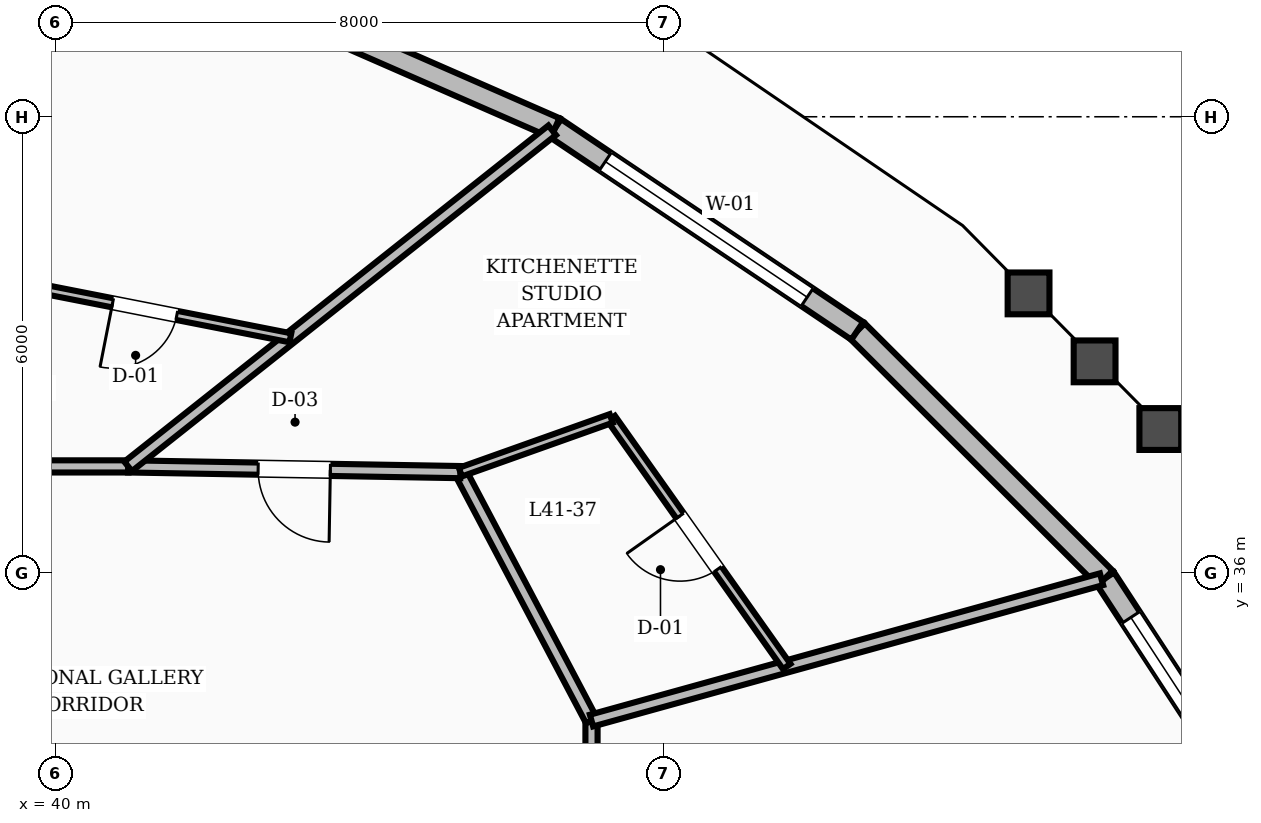
"""IFC4 building model, lengths in metres.
Left out: names, types, materials, properties, quantities, classifications, styles, units other than length and angle.
Written with IfcOpenShell. Run it as: python <this file> out.ifc"""

import sys

from ifc_helpers import new_model, si_unit, direction, frame, frame_2d, origin, place, context, subcontext, project, spatial, rectangle, extrude, element, fill, save


model = new_model("IFC4")
c1 = context("Model", 3, precision=1e-05, world=origin(), true_north=direction((0.0, 1.0)))
c2 = subcontext(c1, "Body", "Model", "MODEL_VIEW")
j1 = project(units=[si_unit("LENGTHUNIT", "METRE"), si_unit("PLANEANGLEUNIT", "RADIAN")], contexts=[c1])
p1 = place(None, origin())
s1 = spatial("IfcSite", under=j1, at=p1, CompositionType="ELEMENT")
p2 = place(p1, origin())
s2 = spatial("IfcBuilding", under=s1, at=p2, CompositionType="ELEMENT")
p3 = place(p2, frame((0.0, 0.0, 160.4)))
s3 = spatial("IfcBuildingStorey", under=s2, at=p3, CompositionType="ELEMENT", Elevation=160.4)
p4 = place(p3, frame((56.232, 32.217, 0.0), z_axis=(0.0, 0.0, 1.0), x_axis=(-0.546719569092, 0.837315778409, 0.0)))
e1 = element("IfcWall", 1, at=p4, inside=s3, PredefinedType="STANDARD", context=c2, shape_type="SweptSolid", body=[
    extrude(rectangle(XDim=4.433, YDim=0.28, at=frame_2d((2.217, 0.0))), origin(), (0.0, 0.0, 1.0), 2.82),
])
p5 = place(p4, frame((0.617, 0.0, 0.8)))
e2 = element("IfcOpeningElement", 2, at=p5, cuts=e1, PredefinedType="OPENING", context=c2, shape_type="SweptSolid", body=[
    extrude(rectangle(XDim=3.2, YDim=1.65, at=frame_2d((1.6, 0.825))), frame((0.0, 0.15, 0.0), z_axis=(0.0, -1.0, 0.0), x_axis=(1.0, 0.0, 0.0)), (0.0, 0.0, 1.0), 0.3),
])
p6 = place(p3, frame((53.809, 35.929, 0.0), z_axis=(0.0, 0.0, 1.0), x_axis=(-0.707980552396, 0.706231928922, 0.0)))
e3 = element("IfcWall", 3, at=p6, inside=s3, PredefinedType="STANDARD", context=c2, shape_type="SweptSolid", body=[
    extrude(rectangle(XDim=4.607, YDim=0.28, at=frame_2d((2.304, 0.0))), origin(), (0.0, 0.0, 1.0), 2.82),
])
p7 = place(p3, frame((50.547, 39.183, 0.0), z_axis=(0.0, 0.0, 1.0), x_axis=(-0.830052550014, 0.557685183787, 0.0)))
e4 = element("IfcWall", 4, at=p7, inside=s3, PredefinedType="STANDARD", context=c2, shape_type="SweptSolid", body=[
    extrude(rectangle(XDim=4.788, YDim=0.28, at=frame_2d((2.394, 0.0))), origin(), (0.0, 0.0, 1.0), 2.82),
])
p8 = place(p7, frame((0.794, 0.0, 0.8)))
e5 = element("IfcOpeningElement", 5, at=p8, cuts=e4, PredefinedType="OPENING", context=c2, shape_type="SweptSolid", body=[
    extrude(rectangle(XDim=3.2, YDim=1.65, at=frame_2d((1.6, 0.825))), frame((0.0, 0.15, 0.0), z_axis=(0.0, -1.0, 0.0), x_axis=(1.0, 0.0, 0.0)), (0.0, 0.0, 1.0), 0.3),
])
p9 = place(p3, frame((46.572, 41.854, 0.0), z_axis=(0.0, 0.0, 1.0), x_axis=(-0.916141485862, 0.400855058447, 0.0)))
e6 = element("IfcWall", 6, at=p9, inside=s3, PredefinedType="STANDARD", context=c2, shape_type="SweptSolid", body=[
    extrude(rectangle(XDim=4.95, YDim=0.28, at=frame_2d((2.475, 0.0))), origin(), (0.0, 0.0, 1.0), 2.82),
])
p10 = place(p3, frame((47.05, 30.234, 0.0), z_axis=(0.0, 0.0, 1.0), x_axis=(0.0, 1.0, 0.0)))
e7 = element("IfcWall", 7, at=p10, inside=s3, PredefinedType="SOLIDWALL", context=c2, shape_type="SweptSolid", body=[
    extrude(rectangle(XDim=3.822, YDim=0.16, at=frame_2d((1.911, 0.0))), origin(), (0.0, 0.0, 1.0), 2.8),
])
p11 = place(p10, frame((1.436, 0.0, 0.0)))
e8 = element("IfcOpeningElement", 8, at=p11, cuts=e7, PredefinedType="OPENING", context=c2, shape_type="SweptSolid", body=[
    extrude(rectangle(XDim=0.95, YDim=2.1, at=frame_2d((0.475, 1.05))), frame((0.0, 0.09, 0.0), z_axis=(0.0, -1.0, 0.0), x_axis=(1.0, 0.0, 0.0)), (0.0, 0.0, 1.0), 0.18),
])
p12 = place(p3, frame((47.05, 34.056, 0.0), z_axis=(0.0, 0.0, 1.0), x_axis=(-0.466737093093, 0.884396113702, 0.0)))
e9 = element("IfcWall", 9, at=p12, inside=s3, PredefinedType="SOLIDWALL", context=c2, shape_type="SweptSolid", body=[
    extrude(rectangle(XDim=3.696, YDim=0.16, at=frame_2d((1.848, 0.0))), origin(), (0.0, 0.0, 1.0), 2.8),
])
p13 = place(p3, frame((45.325, 37.325, 0.0), z_axis=(0.0, 0.0, 1.0), x_axis=(-0.999853038912, 0.017143528788, 0.0)))
e10 = element("IfcWall", 10, at=p13, inside=s3, PredefinedType="SOLIDWALL", context=c2, shape_type="SweptSolid", body=[
    extrude(rectangle(XDim=4.372, YDim=0.16, at=frame_2d((2.186, 0.0))), origin(), (0.0, 0.0, 1.0), 2.8),
])
p14 = place(p13, frame((1.711, 0.0, 0.0)))
e11 = element("IfcOpeningElement", 11, at=p14, cuts=e10, PredefinedType="OPENING", context=c2, shape_type="SweptSolid", body=[
    extrude(rectangle(XDim=0.95, YDim=2.1, at=frame_2d((0.475, 1.05))), frame((0.0, 0.09, 0.0), z_axis=(0.0, -1.0, 0.0), x_axis=(1.0, 0.0, 0.0)), (0.0, 0.0, 1.0), 0.18),
])
p15 = place(p3, frame((40.954, 37.4, 0.0), z_axis=(0.0, 0.0, 1.0), x_axis=(-1.0, 0.0, 0.0)))
e12 = element("IfcWall", 12, at=p15, inside=s3, PredefinedType="SOLIDWALL", context=c2, shape_type="SweptSolid", body=[
    extrude(rectangle(XDim=3.403, YDim=0.16, at=frame_2d((1.702, 0.0))), origin(), (0.0, 0.0, 1.0), 2.8),
])
p16 = place(p3, frame((47.05, 34.056, 0.0), z_axis=(0.0, 0.0, 1.0), x_axis=(0.963668952893, 0.267099511848, 0.0)))
e13 = element("IfcWall", 13, at=p16, inside=s3, PredefinedType="SOLIDWALL", context=c2, shape_type="SweptSolid", body=[
    extrude(rectangle(XDim=6.963, YDim=0.16, at=frame_2d((3.481, 0.0))), origin(), (0.0, 0.0, 1.0), 2.8),
])
p17 = place(p3, frame((49.618, 34.768, 0.0), z_axis=(0.0, 0.0, 1.0), x_axis=(-0.577627537934, 0.816300451684, 0.0)))
e14 = element("IfcWall", 14, at=p17, inside=s3, PredefinedType="PARTITIONING", context=c2, shape_type="SweptSolid", body=[
    extrude(rectangle(XDim=3.998, YDim=0.12, at=frame_2d((1.999, 0.0))), origin(), (0.0, 0.0, 1.0), 2.8),
])
p18 = place(p17, frame((1.569, 0.0, 0.0)))
e15 = element("IfcOpeningElement", 15, at=p18, cuts=e14, PredefinedType="OPENING", context=c2, shape_type="SweptSolid", body=[
    extrude(rectangle(XDim=0.86, YDim=2.1, at=frame_2d((0.43, 1.05))), frame((0.0, 0.07, 0.0), z_axis=(0.0, -1.0, 0.0), x_axis=(1.0, 0.0, 0.0)), (0.0, 0.0, 1.0), 0.14),
])
p19 = place(p3, frame((45.325, 37.325, 0.0), z_axis=(0.0, 0.0, 1.0), x_axis=(0.942126837069, 0.335256652246, 0.0)))
e16 = element("IfcWall", 16, at=p19, inside=s3, PredefinedType="PARTITIONING", context=c2, shape_type="SweptSolid", body=[
    extrude(rectangle(XDim=2.106, YDim=0.12, at=frame_2d((1.053, 0.0))), origin(), (0.0, 0.0, 1.0), 2.8),
])
p20 = place(p3, frame((40.954, 37.4, 0.0), z_axis=(0.0, 0.0, 1.0), x_axis=(0.783647916584, 0.621205234068, 0.0)))
e17 = element("IfcWall", 17, at=p20, inside=s3, PredefinedType="SOLIDWALL", context=c2, shape_type="SweptSolid", body=[
    extrude(rectangle(XDim=7.119, YDim=0.16, at=frame_2d((3.56, 0.0))), origin(), (0.0, 0.0, 1.0), 2.8),
])
p21 = place(p3, frame((43.089, 39.092, 0.0), z_axis=(0.0, 0.0, 1.0), x_axis=(-0.981200665244, 0.192990296451, 0.0)))
e18 = element("IfcWall", 18, at=p21, inside=s3, PredefinedType="PARTITIONING", context=c2, shape_type="SweptSolid", body=[
    extrude(rectangle(XDim=3.906, YDim=0.12, at=frame_2d((1.953, 0.0))), origin(), (0.0, 0.0, 1.0), 2.8),
])
p22 = place(p21, frame((1.523, 0.0, 0.0)))
e19 = element("IfcOpeningElement", 19, at=p22, cuts=e18, PredefinedType="OPENING", context=c2, shape_type="SweptSolid", body=[
    extrude(rectangle(XDim=0.86, YDim=2.1, at=frame_2d((0.43, 1.05))), frame((0.0, 0.07, 0.0), z_axis=(0.0, -1.0, 0.0), x_axis=(1.0, 0.0, 0.0)), (0.0, 0.0, 1.0), 0.14),
])
p23 = place(p5, origin())
e20 = element("IfcWindow", 20, at=p23, inside=s3, PartitioningType="SINGLE_PANEL", PredefinedType="WINDOW", context=c2, shape_type="SweptSolid", body=[
    extrude(rectangle(XDim=3.2, YDim=1.65, at=frame_2d((1.6, 0.825))), frame((0.0, 0.03, 0.0), z_axis=(0.0, -1.0, 0.0), x_axis=(1.0, 0.0, 0.0)), (0.0, 0.0, 1.0), 0.06),
])
fill(e2, e20)
p24 = place(p8, origin())
e21 = element("IfcWindow", 21, at=p24, inside=s3, PartitioningType="SINGLE_PANEL", PredefinedType="WINDOW", context=c2, shape_type="SweptSolid", body=[
    extrude(rectangle(XDim=3.2, YDim=1.65, at=frame_2d((1.6, 0.825))), frame((0.0, 0.03, 0.0), z_axis=(0.0, -1.0, 0.0), x_axis=(1.0, 0.0, 0.0)), (0.0, 0.0, 1.0), 0.06),
])
fill(e5, e21)
p25 = place(p18, origin())
e22 = element("IfcDoor", 22, at=p25, inside=s3, OperationType="SINGLE_SWING_RIGHT", PredefinedType="DOOR", context=c2, shape_type="SweptSolid", body=[
    extrude(rectangle(XDim=0.86, YDim=2.1, at=frame_2d((0.43, 1.05))), frame((0.0, 0.025, 0.0), z_axis=(0.0, -1.0, 0.0), x_axis=(1.0, 0.0, 0.0)), (0.0, 0.0, 1.0), 0.05),
])
fill(e15, e22)
p26 = place(p14, origin())
e23 = element("IfcDoor", 23, at=p26, inside=s3, OperationType="SINGLE_SWING_LEFT", PredefinedType="DOOR", context=c2, shape_type="SweptSolid", body=[
    extrude(rectangle(XDim=0.95, YDim=2.1, at=frame_2d((0.475, 1.05))), frame((0.0, 0.025, 0.0), z_axis=(0.0, -1.0, 0.0), x_axis=(1.0, 0.0, 0.0)), (0.0, 0.0, 1.0), 0.05),
])
fill(e11, e23)
p27 = place(p22, origin())
e24 = element("IfcDoor", 24, at=p27, inside=s3, OperationType="SINGLE_SWING_RIGHT", PredefinedType="DOOR", context=c2, shape_type="SweptSolid", body=[
    extrude(rectangle(XDim=0.86, YDim=2.1, at=frame_2d((0.43, 1.05))), frame((0.0, 0.025, 0.0), z_axis=(0.0, -1.0, 0.0), x_axis=(1.0, 0.0, 0.0)), (0.0, 0.0, 1.0), 0.05),
])
fill(e19, e24)
save(model, sys.argv[1])
